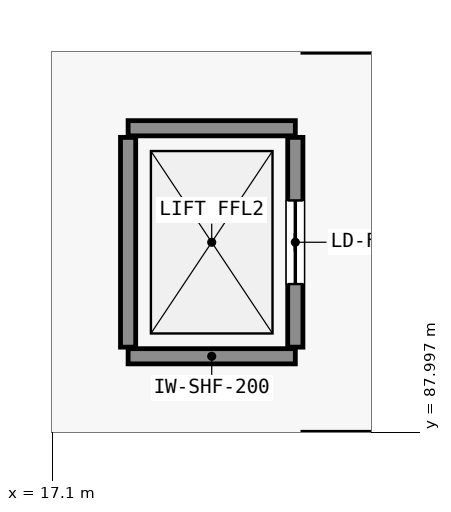
"""IFC4 building model, lengths in metres.
Left out: names, types, materials, properties, quantities, classifications, styles, units other than length and angle.
Written with IfcOpenShell. Run it as: python <this file> out.ifc"""

import sys

from ifc_helpers import new_model, si_unit, direction, frame, frame_2d, origin, place, context, subcontext, project, spatial, rectangle, extrude, element, fill, save


model = new_model("IFC4")
c1 = context("Model", 3, precision=1e-05, world=origin(), true_north=direction((0.0, 1.0)))
c2 = subcontext(c1, "Body", "Model", "MODEL_VIEW")
j1 = project(units=[si_unit("LENGTHUNIT", "METRE"), si_unit("PLANEANGLEUNIT", "RADIAN")], contexts=[c1])
p1 = place(None, origin())
s1 = spatial("IfcSite", under=j1, at=p1, CompositionType="ELEMENT")
p2 = place(p1, origin())
s2 = spatial("IfcBuilding", under=s1, at=p2, CompositionType="ELEMENT")
p3 = place(p2, frame((0.0, 0.0, -5.4)))
s3 = spatial("IfcBuildingStorey", under=s2, at=p3, CompositionType="ELEMENT", Elevation=-5.4)
for number, where, z_axis, x_axis in (
    (1, (18.1, 89.0, 0.0), (0.0, 0.0, 1.0), (1.0, 0.0, 0.0)),
    (2, (18.1, 92.0, 0.0), (0.0, 0.0, 1.0), (1.0, 0.0, 0.0)),
):
    element("IfcWall", number, at=place(p3, frame(where, z_axis=z_axis, x_axis=x_axis)), inside=s3, PredefinedType="STANDARD", context=c2, shape_type="SweptSolid", body=[
        extrude(rectangle(XDim=2.2, YDim=0.2, at=frame_2d((1.1, 0.0))), origin(), (0.0, 0.0, 1.0), 4.96),
    ])
p4 = place(p3, frame((18.1, 89.12, 0.0), z_axis=(0.0, 0.0, 1.0), x_axis=(0.0, 1.0, 0.0)))
e3 = element("IfcWall", 3, at=p4, inside=s3, PredefinedType="STANDARD", context=c2, shape_type="SweptSolid", body=[
    extrude(rectangle(XDim=2.76, YDim=0.2, at=frame_2d((1.38, 0.0))), origin(), (0.0, 0.0, 1.0), 4.96),
])
p5 = place(p3, frame((20.3, 89.12, 0.0), z_axis=(0.0, 0.0, 1.0), x_axis=(0.0, 1.0, 0.0)))
e4 = element("IfcWall", 4, at=p5, inside=s3, PredefinedType="STANDARD", context=c2, shape_type="SweptSolid", body=[
    extrude(rectangle(XDim=2.76, YDim=0.2, at=frame_2d((1.38, 0.0))), origin(), (0.0, 0.0, 1.0), 4.96),
])
p6 = place(p5, frame((0.83, 0.0, 0.0)))
e5 = element("IfcOpeningElement", 5, at=p6, cuts=e4, PredefinedType="OPENING", context=c2, shape_type="SweptSolid", body=[
    extrude(rectangle(XDim=1.1, YDim=2.15, at=frame_2d((0.55, 1.075))), frame((0.0, 0.11, 0.0), z_axis=(0.0, -1.0, 0.0), x_axis=(1.0, 0.0, 0.0)), (0.0, 0.0, 1.0), 0.22),
])
p7 = place(p6, origin())
e6 = element("IfcDoor", 6, at=p7, inside=s3, OperationType="SLIDING_TO_LEFT", PredefinedType="DOOR", context=c2, shape_type="SweptSolid", body=[
    extrude(rectangle(XDim=1.1, YDim=2.15, at=frame_2d((0.55, 1.075))), frame((0.0, 0.025, 0.0), z_axis=(0.0, -1.0, 0.0), x_axis=(1.0, 0.0, 0.0)), (0.0, 0.0, 1.0), 0.05),
])
fill(e5, e6)
save(model, sys.argv[1])
